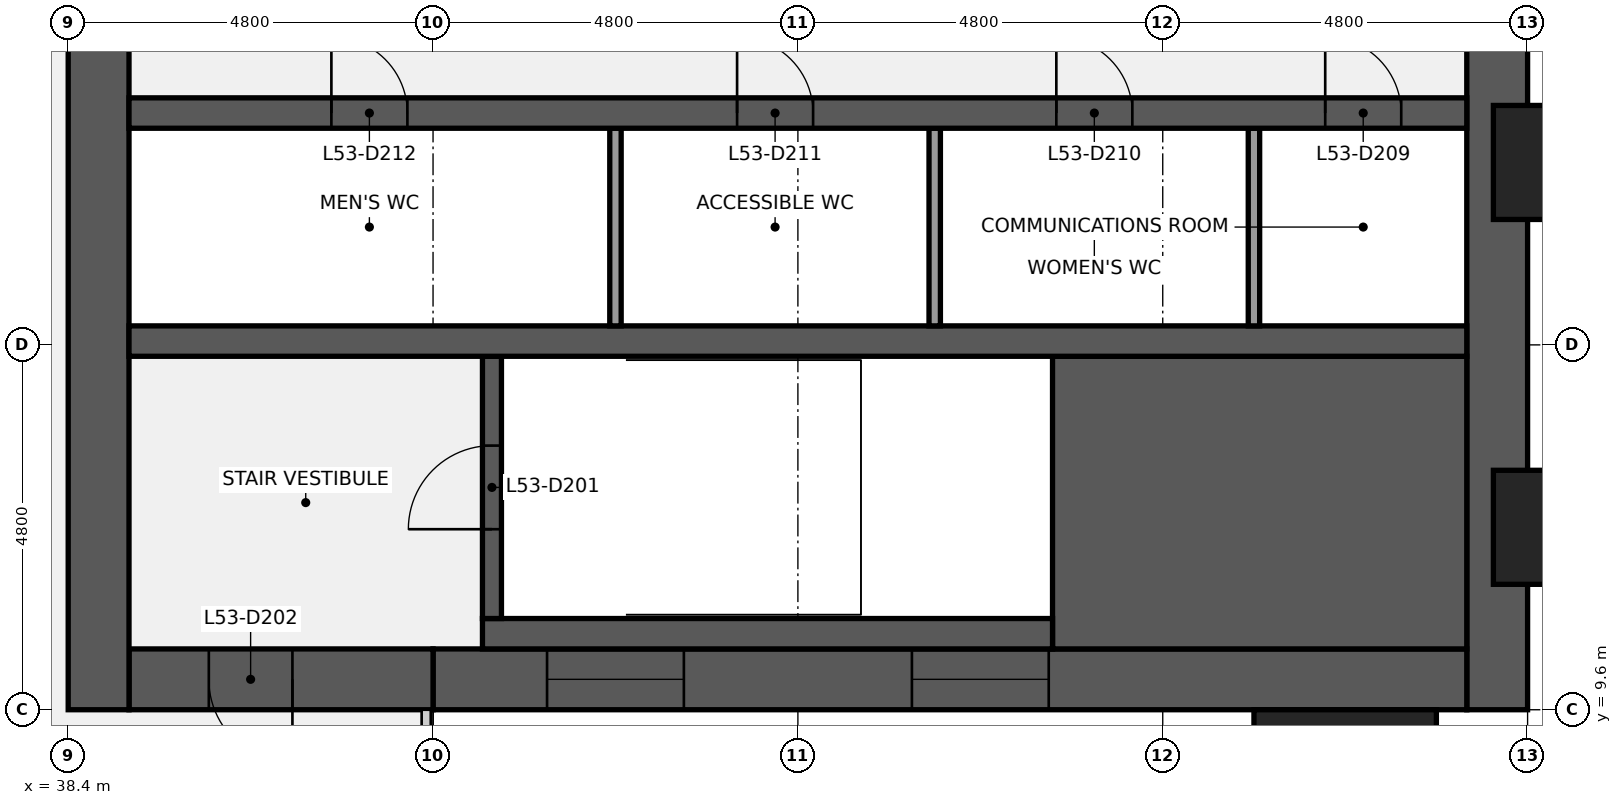
"""IFC4 building model, lengths in metres.
Left out: names, types, materials, properties, quantities, classifications, styles, units other than length and angle.
Written with IfcOpenShell. Run it as: python <this file> out.ifc"""

import sys

from ifc_helpers import new_model, si_unit, direction, frame, frame_2d, origin, origin_2d, place, context, subcontext, project, spatial, rectangle, extrude, element, fill, save


model = new_model("IFC4")
c1 = context("Model", 3, precision=1e-05, world=origin(), true_north=direction((0.0, 1.0)))
c2 = subcontext(c1, "Body", "Model", "MODEL_VIEW")
j1 = project(units=[si_unit("LENGTHUNIT", "METRE"), si_unit("PLANEANGLEUNIT", "RADIAN")], contexts=[c1])
p1 = place(None, origin())
s1 = spatial("IfcSite", under=j1, at=p1, CompositionType="ELEMENT")
p2 = place(p1, origin())
s2 = spatial("IfcBuilding", under=s1, at=p2, CompositionType="ELEMENT")
p3 = place(p2, frame((0.0, 0.0, 241.2)))
s3 = spatial("IfcBuildingStorey", under=s2, at=p3, CompositionType="ELEMENT", Elevation=241.2)
p4 = place(p3, frame((57.2, 38.4, 0.0), z_axis=(0.0, 0.0, 1.0), x_axis=(0.0, -1.0, 0.0)))
e1 = element("IfcWall", 1, at=p4, inside=s3, PredefinedType="SHEAR", context=c2, shape_type="SweptSolid", body=[
    extrude(rectangle(XDim=28.8, YDim=0.8, at=frame_2d((14.4, 0.0))), origin(), (0.0, 0.0, 1.0), 3.84),
])
p5 = place(p4, frame((18.45, 0.0, 0.9)))
e2 = element("IfcOpeningElement", 2, at=p5, cuts=e1, PredefinedType="OPENING", context=c2, shape_type="SweptSolid", body=[
    extrude(rectangle(XDim=1.5, YDim=1.5, at=frame_2d((0.75, 0.75))), frame((0.0, 0.41, 0.0), z_axis=(0.0, -1.0, 0.0), x_axis=(1.0, 0.0, 0.0)), (0.0, 0.0, 1.0), 0.82),
])
p6 = place(p4, frame((8.85, 0.0, 0.9)))
e3 = element("IfcOpeningElement", 3, at=p6, cuts=e1, PredefinedType="OPENING", context=c2, shape_type="SweptSolid", body=[
    extrude(rectangle(XDim=1.5, YDim=1.5, at=frame_2d((0.75, 0.75))), frame((0.0, 0.41, 0.0), z_axis=(0.0, -1.0, 0.0), x_axis=(1.0, 0.0, 0.0)), (0.0, 0.0, 1.0), 0.82),
])
p7 = place(p3, frame((56.8, 10.0, 0.0), z_axis=(0.0, 0.0, 1.0), x_axis=(-1.0, 0.0, 0.0)))
e4 = element("IfcWall", 4, at=p7, inside=s3, PredefinedType="SHEAR", context=c2, shape_type="SweptSolid", body=[
    extrude(rectangle(XDim=13.6, YDim=0.8, at=frame_2d((6.8, 0.0))), origin(), (0.0, 0.0, 1.0), 3.84),
])
p8 = place(p7, frame((5.5, 0.0, 0.9)))
e5 = element("IfcOpeningElement", 5, at=p8, cuts=e4, PredefinedType="OPENING", context=c2, shape_type="SweptSolid", body=[
    extrude(rectangle(XDim=1.8, YDim=1.5, at=frame_2d((0.9, 0.75))), frame((0.0, 0.41, 0.0), z_axis=(0.0, -1.0, 0.0), x_axis=(1.0, 0.0, 0.0)), (0.0, 0.0, 1.0), 0.82),
])
p9 = place(p7, frame((10.3, 0.0, 0.9)))
e6 = element("IfcOpeningElement", 6, at=p9, cuts=e4, PredefinedType="OPENING", context=c2, shape_type="SweptSolid", body=[
    extrude(rectangle(XDim=1.8, YDim=1.5, at=frame_2d((0.9, 0.75))), frame((0.0, 0.41, 0.0), z_axis=(0.0, -1.0, 0.0), x_axis=(1.0, 0.0, 0.0)), (0.0, 0.0, 1.0), 0.82),
])
p10 = place(p3, frame((43.2, 10.0, 0.0), z_axis=(0.0, 0.0, 1.0), x_axis=(-1.0, 0.0, 0.0)))
e7 = element("IfcWall", 7, at=p10, inside=s3, PredefinedType="SHEAR", context=c2, shape_type="SweptSolid", body=[
    extrude(rectangle(XDim=4.0, YDim=0.8, at=frame_2d((2.0, 0.0))), origin(), (0.0, 0.0, 1.0), 3.84),
])
p11 = place(p10, frame((1.85, 0.0, 0.0)))
e8 = element("IfcOpeningElement", 8, at=p11, cuts=e7, PredefinedType="OPENING", context=c2, shape_type="SweptSolid", body=[
    extrude(rectangle(XDim=1.1, YDim=2.1, at=frame_2d((0.55, 1.05))), frame((0.0, 0.41, 0.0), z_axis=(0.0, -1.0, 0.0), x_axis=(1.0, 0.0, 0.0)), (0.0, 0.0, 1.0), 0.82),
])
p12 = place(p3, frame((38.8, 9.6, 0.0), z_axis=(0.0, 0.0, 1.0), x_axis=(0.0, 1.0, 0.0)))
e9 = element("IfcWall", 9, at=p12, inside=s3, PredefinedType="SHEAR", context=c2, shape_type="SweptSolid", body=[
    extrude(rectangle(XDim=28.8, YDim=0.8, at=frame_2d((14.4, 0.0))), origin(), (0.0, 0.0, 1.0), 3.84),
])
p13 = place(p12, frame((8.7, 0.0, 0.0)))
e10 = element("IfcOpeningElement", 10, at=p13, cuts=e9, PredefinedType="OPENING", context=c2, shape_type="SweptSolid", body=[
    extrude(rectangle(XDim=1.8, YDim=2.1, at=frame_2d((0.9, 1.05))), frame((0.0, 0.41, 0.0), z_axis=(0.0, -1.0, 0.0), x_axis=(1.0, 0.0, 0.0)), (0.0, 0.0, 1.0), 0.82),
])
p14 = place(p12, frame((18.3, 0.0, 0.0)))
e11 = element("IfcOpeningElement", 11, at=p14, cuts=e9, PredefinedType="OPENING", context=c2, shape_type="SweptSolid", body=[
    extrude(rectangle(XDim=1.8, YDim=2.1, at=frame_2d((0.9, 1.05))), frame((0.0, 0.41, 0.0), z_axis=(0.0, -1.0, 0.0), x_axis=(1.0, 0.0, 0.0)), (0.0, 0.0, 1.0), 0.82),
])
p15 = place(p3, frame((51.35, 12.325, 0.0), z_axis=(0.0, 0.0, 1.0), x_axis=(1.0, 0.0, 0.0)))
e12 = element("IfcWall", 12, at=p15, inside=s3, PredefinedType="SHEAR", context=c2, shape_type="SweptSolid", body=[
    extrude(rectangle(XDim=5.45, YDim=3.85, at=frame_2d((2.725, 0.0))), origin(), (0.0, 0.0, 1.0), 3.84),
])
p16 = place(p3, frame((43.85, 10.6, 0.0), z_axis=(0.0, 0.0, 1.0), x_axis=(1.0, 0.0, 0.0)))
e13 = element("IfcWall", 13, at=p16, inside=s3, PredefinedType="SHEAR", context=c2, shape_type="SweptSolid", body=[
    extrude(rectangle(XDim=7.5, YDim=0.4, at=frame_2d((3.75, 0.0))), origin(), (0.0, 0.0, 1.0), 3.84),
])
p17 = place(p3, frame((43.975, 10.8, 0.0), z_axis=(0.0, 0.0, 1.0), x_axis=(0.0, 1.0, 0.0)))
e14 = element("IfcWall", 14, at=p17, inside=s3, PredefinedType="SHEAR", context=c2, shape_type="SweptSolid", body=[
    extrude(rectangle(XDim=3.45, YDim=0.25, at=frame_2d((1.725, 0.0))), origin(), (0.0, 0.0, 1.0), 3.84),
])
p18 = place(p17, frame((1.175, 0.0, 0.0)))
e15 = element("IfcOpeningElement", 15, at=p18, cuts=e14, PredefinedType="OPENING", context=c2, shape_type="SweptSolid", body=[
    extrude(rectangle(XDim=1.1, YDim=2.1, at=frame_2d((0.55, 1.05))), frame((0.0, 0.135, 0.0), z_axis=(0.0, -1.0, 0.0), x_axis=(1.0, 0.0, 0.0)), (0.0, 0.0, 1.0), 0.27),
])
p19 = place(p3, frame((39.2, 14.45, 0.0), z_axis=(0.0, 0.0, 1.0), x_axis=(1.0, 0.0, 0.0)))
e16 = element("IfcWall", 16, at=p19, inside=s3, PredefinedType="SHEAR", context=c2, shape_type="SweptSolid", body=[
    extrude(rectangle(XDim=17.6, YDim=0.4, at=frame_2d((8.8, 0.0))), origin(), (0.0, 0.0, 1.0), 3.84),
])
for number, where, z_axis, x_axis in (
    (17, (54.0, 14.65, 0.0), (0.0, 0.0, 1.0), (0.0, 1.0, 0.0)),
    (18, (49.8, 14.65, 0.0), (0.0, 0.0, 1.0), (0.0, 1.0, 0.0)),
    (19, (45.6, 14.65, 0.0), (0.0, 0.0, 1.0), (0.0, 1.0, 0.0)),
):
    element("IfcWall", number, at=place(p3, frame(where, z_axis=z_axis, x_axis=x_axis)), inside=s3, PredefinedType="PARTITIONING", context=c2, shape_type="SweptSolid", body=[
        extrude(rectangle(XDim=2.6, YDim=0.15, at=frame_2d((1.3, 0.0))), origin(), (0.0, 0.0, 1.0), 3.84),
    ])
p20 = place(p3, frame((39.2, 17.45, 0.0), z_axis=(0.0, 0.0, 1.0), x_axis=(1.0, 0.0, 0.0)))
e20 = element("IfcWall", 20, at=p20, inside=s3, PredefinedType="SHEAR", context=c2, shape_type="SweptSolid", body=[
    extrude(rectangle(XDim=17.6, YDim=0.4, at=frame_2d((8.8, 0.0))), origin(), (0.0, 0.0, 1.0), 3.84),
])
p21 = place(p20, frame((15.738, 0.0, 0.0)))
e21 = element("IfcOpeningElement", 21, at=p21, cuts=e20, PredefinedType="OPENING", context=c2, shape_type="SweptSolid", body=[
    extrude(rectangle(XDim=1.0, YDim=2.1, at=frame_2d((0.5, 1.05))), frame((0.0, 0.21, 0.0), z_axis=(0.0, -1.0, 0.0), x_axis=(1.0, 0.0, 0.0)), (0.0, 0.0, 1.0), 0.42),
])
p22 = place(p20, frame((12.2, 0.0, 0.0)))
e22 = element("IfcOpeningElement", 22, at=p22, cuts=e20, PredefinedType="OPENING", context=c2, shape_type="SweptSolid", body=[
    extrude(rectangle(XDim=1.0, YDim=2.1, at=frame_2d((0.5, 1.05))), frame((0.0, 0.21, 0.0), z_axis=(0.0, -1.0, 0.0), x_axis=(1.0, 0.0, 0.0)), (0.0, 0.0, 1.0), 0.42),
])
p23 = place(p20, frame((8.0, 0.0, 0.0)))
e23 = element("IfcOpeningElement", 23, at=p23, cuts=e20, PredefinedType="OPENING", context=c2, shape_type="SweptSolid", body=[
    extrude(rectangle(XDim=1.0, YDim=2.1, at=frame_2d((0.5, 1.05))), frame((0.0, 0.21, 0.0), z_axis=(0.0, -1.0, 0.0), x_axis=(1.0, 0.0, 0.0)), (0.0, 0.0, 1.0), 0.42),
])
p24 = place(p20, frame((2.663, 0.0, 0.0)))
e24 = element("IfcOpeningElement", 24, at=p24, cuts=e20, PredefinedType="OPENING", context=c2, shape_type="SweptSolid", body=[
    extrude(rectangle(XDim=1.0, YDim=2.1, at=frame_2d((0.5, 1.05))), frame((0.0, 0.21, 0.0), z_axis=(0.0, -1.0, 0.0), x_axis=(1.0, 0.0, 0.0)), (0.0, 0.0, 1.0), 0.42),
])
for number, where, z_axis, x_axis in (
    (25, (55.2, 8.85, 0.0), (0.0, 0.0, 1.0), (1.0, 0.0, 0.0)),
    (26, (58.35, 12.0, 0.0), (0.0, 0.0, 1.0), (0.0, 1.0, 0.0)),
    (27, (58.35, 16.8, 0.0), (0.0, 0.0, 1.0), (0.0, 1.0, 0.0)),
):
    element("IfcColumn", number, at=place(p3, frame(where, z_axis=z_axis, x_axis=x_axis)), inside=s3, PredefinedType="PILASTER", context=c2, shape_type="SweptSolid", body=[
        extrude(rectangle(XDim=2.4, YDim=1.5, at=origin_2d()), origin(), (0.0, 0.0, 1.0), 4.0),
    ])
p25 = place(p18, origin())
e28 = element("IfcDoor", 28, at=p25, inside=s3, OperationType="SINGLE_SWING_LEFT", PredefinedType="DOOR", context=c2, shape_type="SweptSolid", body=[
    extrude(rectangle(XDim=1.1, YDim=2.1, at=frame_2d((0.55, 1.05))), frame((0.0, 0.025, 0.0), z_axis=(0.0, -1.0, 0.0), x_axis=(1.0, 0.0, 0.0)), (0.0, 0.0, 1.0), 0.05),
])
fill(e15, e28)
p26 = place(p11, origin())
e29 = element("IfcDoor", 29, at=p26, inside=s3, OperationType="SINGLE_SWING_LEFT", PredefinedType="DOOR", context=c2, shape_type="SweptSolid", body=[
    extrude(rectangle(XDim=1.1, YDim=2.1, at=frame_2d((0.55, 1.05))), frame((0.0, 0.025, 0.0), z_axis=(0.0, -1.0, 0.0), x_axis=(1.0, 0.0, 0.0)), (0.0, 0.0, 1.0), 0.05),
])
fill(e8, e29)
p27 = place(p21, origin())
e30 = element("IfcDoor", 30, at=p27, inside=s3, OperationType="SINGLE_SWING_LEFT", PredefinedType="DOOR", context=c2, shape_type="SweptSolid", body=[
    extrude(rectangle(XDim=1.0, YDim=2.1, at=frame_2d((0.5, 1.05))), frame((0.0, 0.025, 0.0), z_axis=(0.0, -1.0, 0.0), x_axis=(1.0, 0.0, 0.0)), (0.0, 0.0, 1.0), 0.05),
])
fill(e21, e30)
p28 = place(p22, origin())
e31 = element("IfcDoor", 31, at=p28, inside=s3, OperationType="SINGLE_SWING_LEFT", PredefinedType="DOOR", context=c2, shape_type="SweptSolid", body=[
    extrude(rectangle(XDim=1.0, YDim=2.1, at=frame_2d((0.5, 1.05))), frame((0.0, 0.025, 0.0), z_axis=(0.0, -1.0, 0.0), x_axis=(1.0, 0.0, 0.0)), (0.0, 0.0, 1.0), 0.05),
])
fill(e22, e31)
p29 = place(p23, origin())
e32 = element("IfcDoor", 32, at=p29, inside=s3, OperationType="SINGLE_SWING_LEFT", PredefinedType="DOOR", context=c2, shape_type="SweptSolid", body=[
    extrude(rectangle(XDim=1.0, YDim=2.1, at=frame_2d((0.5, 1.05))), frame((0.0, 0.025, 0.0), z_axis=(0.0, -1.0, 0.0), x_axis=(1.0, 0.0, 0.0)), (0.0, 0.0, 1.0), 0.05),
])
fill(e23, e32)
p30 = place(p24, origin())
e33 = element("IfcDoor", 33, at=p30, inside=s3, OperationType="SINGLE_SWING_LEFT", PredefinedType="DOOR", context=c2, shape_type="SweptSolid", body=[
    extrude(rectangle(XDim=1.0, YDim=2.1, at=frame_2d((0.5, 1.05))), frame((0.0, 0.025, 0.0), z_axis=(0.0, -1.0, 0.0), x_axis=(1.0, 0.0, 0.0)), (0.0, 0.0, 1.0), 0.05),
])
fill(e24, e33)
p31 = place(p8, origin())
e34 = element("IfcWindow", 34, at=p31, inside=s3, PartitioningType="SINGLE_PANEL", PredefinedType="WINDOW", context=c2, shape_type="SweptSolid", body=[
    extrude(rectangle(XDim=1.8, YDim=1.5, at=frame_2d((0.9, 0.75))), frame((0.0, 0.03, 0.0), z_axis=(0.0, -1.0, 0.0), x_axis=(1.0, 0.0, 0.0)), (0.0, 0.0, 1.0), 0.06),
])
fill(e5, e34)
p32 = place(p9, origin())
e35 = element("IfcWindow", 35, at=p32, inside=s3, PartitioningType="SINGLE_PANEL", PredefinedType="WINDOW", context=c2, shape_type="SweptSolid", body=[
    extrude(rectangle(XDim=1.8, YDim=1.5, at=frame_2d((0.9, 0.75))), frame((0.0, 0.03, 0.0), z_axis=(0.0, -1.0, 0.0), x_axis=(1.0, 0.0, 0.0)), (0.0, 0.0, 1.0), 0.06),
])
fill(e6, e35)
save(model, sys.argv[1])
